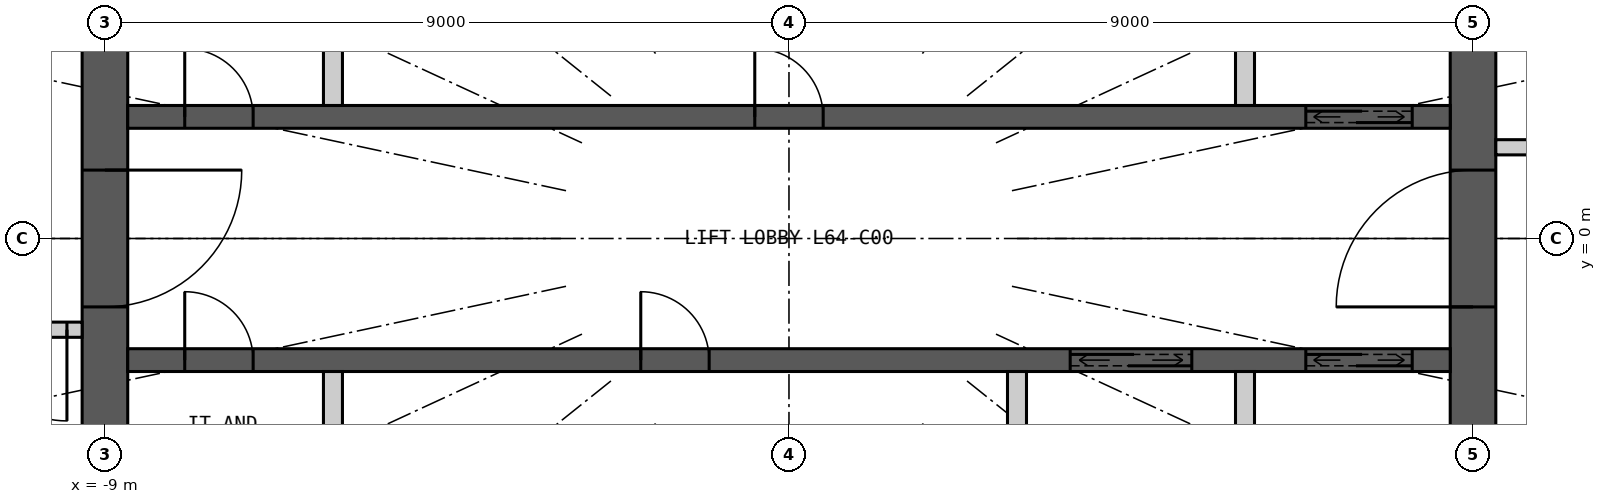
"""IFC4 building model, lengths in metres.
Left out: names, types, materials, properties, quantities, classifications, styles, units other than length and angle.
Written with IfcOpenShell. Run it as: python <this file> out.ifc"""

import sys

from ifc_helpers import new_model, si_unit, direction, frame, frame_2d, origin, place, context, subcontext, project, spatial, rectangle, extrude, element, fill, save


model = new_model("IFC4")
c1 = context("Model", 3, precision=1e-05, world=origin(), true_north=direction((0.0, 1.0)))
c2 = subcontext(c1, "Body", "Model", "MODEL_VIEW")
j1 = project(units=[si_unit("LENGTHUNIT", "METRE"), si_unit("PLANEANGLEUNIT", "RADIAN")], contexts=[c1])
p1 = place(None, origin())
s1 = spatial("IfcSite", under=j1, at=p1, CompositionType="ELEMENT")
p2 = place(p1, origin())
s2 = spatial("IfcBuilding", under=s1, at=p2, CompositionType="ELEMENT")
p3 = place(p2, frame((0.0, 0.0, 237.3)))
s3 = spatial("IfcBuildingStorey", under=s2, at=p3, CompositionType="ELEMENT", Elevation=237.3)
p4 = place(p3, frame((9.0, -7.7, 0.0), z_axis=(0.0, 0.0, 1.0), x_axis=(0.0, 1.0, 0.0)))
e1 = element("IfcWall", 1, at=p4, inside=s3, PredefinedType="SHEAR", context=c2, shape_type="SweptSolid", body=[
    extrude(rectangle(XDim=15.4, YDim=0.6, at=frame_2d((7.7, 0.0))), origin(), (0.0, 0.0, 1.0), 5.4),
])
p5 = place(p4, frame((6.8, 0.0, 0.0)))
e2 = element("IfcOpeningElement", 2, at=p5, cuts=e1, PredefinedType="OPENING", context=c2, shape_type="SweptSolid", body=[
    extrude(rectangle(XDim=1.8, YDim=2.2, at=frame_2d((0.9, 1.1))), frame((0.0, 0.31, 0.0), z_axis=(0.0, -1.0, 0.0), x_axis=(1.0, 0.0, 0.0)), (0.0, 0.0, 1.0), 0.62),
])
p6 = place(p3, frame((-9.0, 7.7, 0.0), z_axis=(0.0, 0.0, 1.0), x_axis=(0.0, -1.0, 0.0)))
e3 = element("IfcWall", 3, at=p6, inside=s3, PredefinedType="SHEAR", context=c2, shape_type="SweptSolid", body=[
    extrude(rectangle(XDim=15.4, YDim=0.6, at=frame_2d((7.7, 0.0))), origin(), (0.0, 0.0, 1.0), 5.4),
])
p7 = place(p6, frame((6.8, 0.0, 0.0)))
e4 = element("IfcOpeningElement", 4, at=p7, cuts=e3, PredefinedType="OPENING", context=c2, shape_type="SweptSolid", body=[
    extrude(rectangle(XDim=1.8, YDim=2.2, at=frame_2d((0.9, 1.1))), frame((0.0, 0.31, 0.0), z_axis=(0.0, -1.0, 0.0), x_axis=(1.0, 0.0, 0.0)), (0.0, 0.0, 1.0), 0.62),
])
p8 = place(p3, frame((-8.7, 1.6, 0.0), z_axis=(0.0, 0.0, 1.0), x_axis=(1.0, 0.0, 0.0)))
e5 = element("IfcWall", 5, at=p8, inside=s3, PredefinedType="SHEAR", context=c2, shape_type="SweptSolid", body=[
    extrude(rectangle(XDim=17.4, YDim=0.3, at=frame_2d((8.7, 0.0))), origin(), (0.0, 0.0, 1.0), 5.4),
])
p9 = place(p8, frame((15.5, 0.0, 0.0)))
e6 = element("IfcOpeningElement", 6, at=p9, cuts=e5, PredefinedType="OPENING", context=c2, shape_type="SweptSolid", body=[
    extrude(rectangle(XDim=1.4, YDim=2.4, at=frame_2d((0.7, 1.2))), frame((0.0, 0.16, 0.0), z_axis=(0.0, -1.0, 0.0), x_axis=(1.0, 0.0, 0.0)), (0.0, 0.0, 1.0), 0.32),
])
p10 = place(p8, frame((0.75, 0.0, 0.0)))
e7 = element("IfcOpeningElement", 7, at=p10, cuts=e5, PredefinedType="OPENING", context=c2, shape_type="SweptSolid", body=[
    extrude(rectangle(XDim=0.9, YDim=2.2, at=frame_2d((0.45, 1.1))), frame((0.0, 0.16, 0.0), z_axis=(0.0, -1.0, 0.0), x_axis=(1.0, 0.0, 0.0)), (0.0, 0.0, 1.0), 0.32),
])
p11 = place(p8, frame((8.25, 0.0, 0.0)))
e8 = element("IfcOpeningElement", 8, at=p11, cuts=e5, PredefinedType="OPENING", context=c2, shape_type="SweptSolid", body=[
    extrude(rectangle(XDim=0.9, YDim=2.2, at=frame_2d((0.45, 1.1))), frame((0.0, 0.16, 0.0), z_axis=(0.0, -1.0, 0.0), x_axis=(1.0, 0.0, 0.0)), (0.0, 0.0, 1.0), 0.32),
])
p12 = place(p3, frame((-8.7, -1.6, 0.0), z_axis=(0.0, 0.0, 1.0), x_axis=(1.0, 0.0, 0.0)))
e9 = element("IfcWall", 9, at=p12, inside=s3, PredefinedType="SHEAR", context=c2, shape_type="SweptSolid", body=[
    extrude(rectangle(XDim=17.4, YDim=0.3, at=frame_2d((8.7, 0.0))), origin(), (0.0, 0.0, 1.0), 5.4),
])
p13 = place(p12, frame((12.4, 0.0, 0.0)))
e10 = element("IfcOpeningElement", 10, at=p13, cuts=e9, PredefinedType="OPENING", context=c2, shape_type="SweptSolid", body=[
    extrude(rectangle(XDim=1.6, YDim=2.4, at=frame_2d((0.8, 1.2))), frame((0.0, 0.16, 0.0), z_axis=(0.0, -1.0, 0.0), x_axis=(1.0, 0.0, 0.0)), (0.0, 0.0, 1.0), 0.32),
])
p14 = place(p12, frame((15.5, 0.0, 0.0)))
e11 = element("IfcOpeningElement", 11, at=p14, cuts=e9, PredefinedType="OPENING", context=c2, shape_type="SweptSolid", body=[
    extrude(rectangle(XDim=1.4, YDim=2.4, at=frame_2d((0.7, 1.2))), frame((0.0, 0.16, 0.0), z_axis=(0.0, -1.0, 0.0), x_axis=(1.0, 0.0, 0.0)), (0.0, 0.0, 1.0), 0.32),
])
p15 = place(p12, frame((0.75, 0.0, 0.0)))
e12 = element("IfcOpeningElement", 12, at=p15, cuts=e9, PredefinedType="OPENING", context=c2, shape_type="SweptSolid", body=[
    extrude(rectangle(XDim=0.9, YDim=2.2, at=frame_2d((0.45, 1.1))), frame((0.0, 0.16, 0.0), z_axis=(0.0, -1.0, 0.0), x_axis=(1.0, 0.0, 0.0)), (0.0, 0.0, 1.0), 0.32),
])
p16 = place(p12, frame((6.75, 0.0, 0.0)))
e13 = element("IfcOpeningElement", 13, at=p16, cuts=e9, PredefinedType="OPENING", context=c2, shape_type="SweptSolid", body=[
    extrude(rectangle(XDim=0.9, YDim=2.2, at=frame_2d((0.45, 1.1))), frame((0.0, 0.16, 0.0), z_axis=(0.0, -1.0, 0.0), x_axis=(1.0, 0.0, 0.0)), (0.0, 0.0, 1.0), 0.32),
])
for number, where, z_axis, x_axis in (
    (14, (-6.0, 1.75, 0.0), (0.0, 0.0, 1.0), (0.0, 1.0, 0.0)),
    (15, (6.0, 1.75, 0.0), (0.0, 0.0, 1.0), (0.0, 1.0, 0.0)),
    (16, (-6.0, -4.1, 0.0), (0.0, 0.0, 1.0), (0.0, 1.0, 0.0)),
    (17, (3.0, -4.1, 0.0), (0.0, 0.0, 1.0), (0.0, 1.0, 0.0)),
    (18, (6.0, -4.1, 0.0), (0.0, 0.0, 1.0), (0.0, 1.0, 0.0)),
):
    element("IfcWall", number, at=place(p3, frame(where, z_axis=z_axis, x_axis=x_axis)), inside=s3, PredefinedType="PARTITIONING", context=c2, shape_type="SweptSolid", body=[
        extrude(rectangle(XDim=2.35, YDim=0.25, at=frame_2d((1.175, 0.0))), origin(), (0.0, 0.0, 1.0), 5.4),
    ])
p17 = place(p3, frame((9.3, 1.2, 0.0), z_axis=(0.0, 0.0, 1.0), x_axis=(1.0, 0.0, 0.0)))
e19 = element("IfcWall", 19, at=p17, inside=s3, PredefinedType="PARTITIONING", context=c2, shape_type="SweptSolid", body=[
    extrude(rectangle(XDim=1.8, YDim=0.2, at=frame_2d((0.9, 0.0))), origin(), (0.0, 0.0, 1.0), 5.15),
])
p18 = place(p3, frame((-9.3, -1.2, 0.0), z_axis=(0.0, 0.0, 1.0), x_axis=(-1.0, 0.0, 0.0)))
e20 = element("IfcWall", 20, at=p18, inside=s3, PredefinedType="PARTITIONING", context=c2, shape_type="SweptSolid", body=[
    extrude(rectangle(XDim=1.7, YDim=0.2, at=frame_2d((0.85, 0.0))), origin(), (0.0, 0.0, 1.0), 5.15),
])
p19 = place(p18, frame((0.2, 0.0, 0.0)))
e21 = element("IfcOpeningElement", 21, at=p19, cuts=e20, PredefinedType="OPENING", context=c2, shape_type="SweptSolid", body=[
    extrude(rectangle(XDim=1.2, YDim=2.2, at=frame_2d((0.6, 1.1))), frame((0.0, 0.11, 0.0), z_axis=(0.0, -1.0, 0.0), x_axis=(1.0, 0.0, 0.0)), (0.0, 0.0, 1.0), 0.22),
])
p20 = place(p19, origin())
e22 = element("IfcDoor", 22, at=p20, inside=s3, OperationType="SINGLE_SWING_LEFT", PredefinedType="DOOR", context=c2, shape_type="SweptSolid", body=[
    extrude(rectangle(XDim=1.2, YDim=2.2, at=frame_2d((0.6, 1.1))), frame((0.0, 0.025, 0.0), z_axis=(0.0, -1.0, 0.0), x_axis=(1.0, 0.0, 0.0)), (0.0, 0.0, 1.0), 0.05),
])
fill(e21, e22)
p21 = place(p9, origin())
e23 = element("IfcDoor", 23, at=p21, inside=s3, OperationType="DOUBLE_DOOR_SLIDING", PredefinedType="DOOR", context=c2, shape_type="SweptSolid", body=[
    extrude(rectangle(XDim=1.4, YDim=2.4, at=frame_2d((0.7, 1.2))), frame((0.0, 0.025, 0.0), z_axis=(0.0, -1.0, 0.0), x_axis=(1.0, 0.0, 0.0)), (0.0, 0.0, 1.0), 0.05),
])
fill(e6, e23)
p22 = place(p13, origin())
e24 = element("IfcDoor", 24, at=p22, inside=s3, OperationType="DOUBLE_DOOR_SLIDING", PredefinedType="DOOR", context=c2, shape_type="SweptSolid", body=[
    extrude(rectangle(XDim=1.6, YDim=2.4, at=frame_2d((0.8, 1.2))), frame((0.0, 0.025, 0.0), z_axis=(0.0, -1.0, 0.0), x_axis=(1.0, 0.0, 0.0)), (0.0, 0.0, 1.0), 0.05),
])
fill(e10, e24)
p23 = place(p14, origin())
e25 = element("IfcDoor", 25, at=p23, inside=s3, OperationType="DOUBLE_DOOR_SLIDING", PredefinedType="DOOR", context=c2, shape_type="SweptSolid", body=[
    extrude(rectangle(XDim=1.4, YDim=2.4, at=frame_2d((0.7, 1.2))), frame((0.0, 0.025, 0.0), z_axis=(0.0, -1.0, 0.0), x_axis=(1.0, 0.0, 0.0)), (0.0, 0.0, 1.0), 0.05),
])
fill(e11, e25)
p24 = place(p10, origin())
e26 = element("IfcDoor", 26, at=p24, inside=s3, OperationType="SINGLE_SWING_LEFT", PredefinedType="DOOR", context=c2, shape_type="SweptSolid", body=[
    extrude(rectangle(XDim=0.9, YDim=2.2, at=frame_2d((0.45, 1.1))), frame((0.0, 0.025, 0.0), z_axis=(0.0, -1.0, 0.0), x_axis=(1.0, 0.0, 0.0)), (0.0, 0.0, 1.0), 0.05),
])
fill(e7, e26)
p25 = place(p11, origin())
e27 = element("IfcDoor", 27, at=p25, inside=s3, OperationType="SINGLE_SWING_LEFT", PredefinedType="DOOR", context=c2, shape_type="SweptSolid", body=[
    extrude(rectangle(XDim=0.9, YDim=2.2, at=frame_2d((0.45, 1.1))), frame((0.0, 0.025, 0.0), z_axis=(0.0, -1.0, 0.0), x_axis=(1.0, 0.0, 0.0)), (0.0, 0.0, 1.0), 0.05),
])
fill(e8, e27)
p26 = place(p15, origin())
e28 = element("IfcDoor", 28, at=p26, inside=s3, OperationType="SINGLE_SWING_LEFT", PredefinedType="DOOR", context=c2, shape_type="SweptSolid", body=[
    extrude(rectangle(XDim=0.9, YDim=2.2, at=frame_2d((0.45, 1.1))), frame((0.0, 0.025, 0.0), z_axis=(0.0, -1.0, 0.0), x_axis=(1.0, 0.0, 0.0)), (0.0, 0.0, 1.0), 0.05),
])
fill(e12, e28)
p27 = place(p16, origin())
e29 = element("IfcDoor", 29, at=p27, inside=s3, OperationType="SINGLE_SWING_LEFT", PredefinedType="DOOR", context=c2, shape_type="SweptSolid", body=[
    extrude(rectangle(XDim=0.9, YDim=2.2, at=frame_2d((0.45, 1.1))), frame((0.0, 0.025, 0.0), z_axis=(0.0, -1.0, 0.0), x_axis=(1.0, 0.0, 0.0)), (0.0, 0.0, 1.0), 0.05),
])
fill(e13, e29)
p28 = place(p5, origin())
e30 = element("IfcDoor", 30, at=p28, inside=s3, OperationType="DOUBLE_DOOR_DOUBLE_SWING", PredefinedType="DOOR", context=c2, shape_type="SweptSolid", body=[
    extrude(rectangle(XDim=1.8, YDim=2.2, at=frame_2d((0.9, 1.1))), frame((0.0, 0.025, 0.0), z_axis=(0.0, -1.0, 0.0), x_axis=(1.0, 0.0, 0.0)), (0.0, 0.0, 1.0), 0.05),
])
fill(e2, e30)
p29 = place(p7, origin())
e31 = element("IfcDoor", 31, at=p29, inside=s3, OperationType="DOUBLE_DOOR_DOUBLE_SWING", PredefinedType="DOOR", context=c2, shape_type="SweptSolid", body=[
    extrude(rectangle(XDim=1.8, YDim=2.2, at=frame_2d((0.9, 1.1))), frame((0.0, 0.025, 0.0), z_axis=(0.0, -1.0, 0.0), x_axis=(1.0, 0.0, 0.0)), (0.0, 0.0, 1.0), 0.05),
])
fill(e4, e31)
save(model, sys.argv[1])
